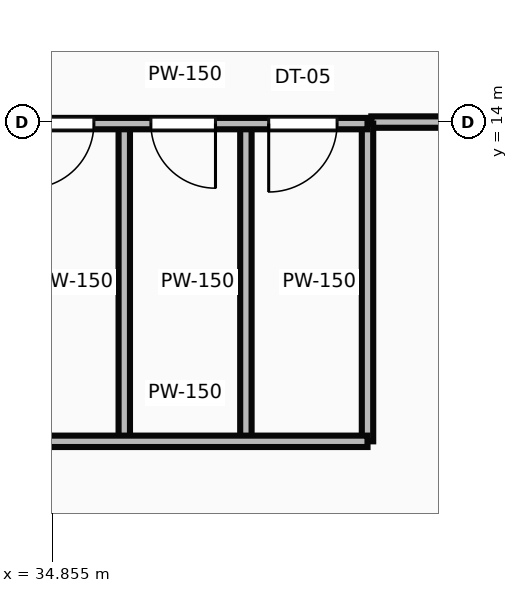
"""IFC4 building model, lengths in metres.
Left out: names, types, materials, properties, quantities, classifications, styles, units other than length and angle.
Written with IfcOpenShell. Run it as: python <this file> out.ifc"""

import sys

from ifc_helpers import new_model, si_unit, direction, frame, frame_2d, origin, place, context, subcontext, project, spatial, rectangle, extrude, source, transform, mapped, element, fill, save


model = new_model("IFC4")
c1 = context("Model", 3, precision=1e-05, world=origin(), true_north=direction((0.0, 1.0)))
c2 = subcontext(c1, "Body", "Model", "MODEL_VIEW")
j1 = project(units=[si_unit("LENGTHUNIT", "METRE"), si_unit("PLANEANGLEUNIT", "RADIAN")], contexts=[c1])
p1 = place(None, origin())
s1 = spatial("IfcSite", under=j1, at=p1, CompositionType="ELEMENT")
p2 = place(p1, origin())
s2 = spatial("IfcBuilding", under=s1, at=p2, CompositionType="ELEMENT")
p3 = place(p2, frame((0.0, 0.0, 32.5)))
s3 = spatial("IfcBuildingStorey", under=s2, at=p3, CompositionType="ELEMENT", Elevation=32.5)
m1 = source(origin(), c2, "Body", "SweptSolid", [
    extrude(rectangle(XDim=4.8, YDim=0.15, at=frame_2d((2.4, 0.0))), origin(), (0.0, 0.0, 1.0), 2.625),
])
p4 = place(p3, frame((34.2, 13.98, 0.0), z_axis=(0.0, 0.0, 1.0), x_axis=(1.0, 0.0, 0.0)))
e1 = element("IfcWall", 1, at=p4, inside=s3, PredefinedType="PARTITIONING", context=c2, shape_type="MappedRepresentation", body=[
    mapped(m1, transform((0.0, 0.0, 0.0))),
])
p5 = place(p4, frame((0.35, 0.0, 0.0)))
e2 = element("IfcOpeningElement", 2, at=p5, cuts=e1, PredefinedType="OPENING", context=c2, shape_type="SweptSolid", body=[
    extrude(rectangle(XDim=0.85, YDim=2.1, at=frame_2d((0.425, 1.05))), frame((0.0, 0.085, 0.0), z_axis=(0.0, -1.0, 0.0), x_axis=(1.0, 0.0, 0.0)), (0.0, 0.0, 1.0), 0.17),
])
p6 = place(p4, frame((1.95, 0.0, 0.0)))
e3 = element("IfcOpeningElement", 3, at=p6, cuts=e1, PredefinedType="OPENING", context=c2, shape_type="SweptSolid", body=[
    extrude(rectangle(XDim=0.85, YDim=2.1, at=frame_2d((0.425, 1.05))), frame((0.0, 0.085, 0.0), z_axis=(0.0, -1.0, 0.0), x_axis=(1.0, 0.0, 0.0)), (0.0, 0.0, 1.0), 0.17),
])
p7 = place(p4, frame((3.5, 0.0, 0.0)))
e4 = element("IfcOpeningElement", 4, at=p7, cuts=e1, PredefinedType="OPENING", context=c2, shape_type="SweptSolid", body=[
    extrude(rectangle(XDim=0.9, YDim=2.1, at=frame_2d((0.45, 1.05))), frame((0.0, 0.085, 0.0), z_axis=(0.0, -1.0, 0.0), x_axis=(1.0, 0.0, 0.0)), (0.0, 0.0, 1.0), 0.17),
])
m2 = source(origin(), c2, "Body", "SweptSolid", [
    extrude(rectangle(XDim=4.8, YDim=0.15, at=frame_2d((2.4, 0.0))), origin(), (0.0, 0.0, 1.0), 3.4),
])
p8 = place(p3, frame((34.2, 9.8, 0.0), z_axis=(0.0, 0.0, 1.0), x_axis=(1.0, 0.0, 0.0)))
e5 = element("IfcWall", 5, at=p8, inside=s3, PredefinedType="PARTITIONING", context=c2, shape_type="MappedRepresentation", body=[
    mapped(m2, transform((0.0, 0.0, 0.0))),
])
m3 = source(origin(), c2, "Body", "SweptSolid", [
    extrude(rectangle(XDim=4.18, YDim=0.15, at=frame_2d((2.09, 0.0))), origin(), (0.0, 0.0, 1.0), 3.4),
])
for number, where, z_axis, x_axis in (
    (6, (39.0, 9.8, 0.0), (0.0, 0.0, 1.0), (0.0, 1.0, 0.0)),
    (7, (35.8, 9.8, 0.0), (0.0, 0.0, 1.0), (0.0, 1.0, 0.0)),
    (8, (37.4, 9.8, 0.0), (0.0, 0.0, 1.0), (0.0, 1.0, 0.0)),
):
    element("IfcWall", number, at=place(p3, frame(where, z_axis=z_axis, x_axis=x_axis)), inside=s3, PredefinedType="PARTITIONING", context=c2, shape_type="MappedRepresentation", body=[
        mapped(m3, transform((0.0, 0.0, 0.0))),
    ])
m4 = source(origin(), c2, "Body", "SweptSolid", [
    extrude(rectangle(XDim=7.75, YDim=0.15, at=frame_2d((3.875, 0.0))), origin(), (0.0, 0.0, 1.0), 2.625),
])
p9 = place(p3, frame((46.8, 14.0, 0.0), z_axis=(0.0, 0.0, 1.0), x_axis=(-1.0, 0.0, 0.0)))
e9 = element("IfcWall", 9, at=p9, inside=s3, PredefinedType="PARTITIONING", context=c2, shape_type="MappedRepresentation", body=[
    mapped(m4, transform((0.0, 0.0, 0.0))),
])
p10 = place(p9, frame((2.226, 0.0, 0.0)))
e10 = element("IfcOpeningElement", 10, at=p10, cuts=e9, PredefinedType="OPENING", context=c2, shape_type="SweptSolid", body=[
    extrude(rectangle(XDim=0.95, YDim=2.15, at=frame_2d((0.475, 1.075))), frame((0.0, 0.085, 0.0), z_axis=(0.0, -1.0, 0.0), x_axis=(1.0, 0.0, 0.0)), (0.0, 0.0, 1.0), 0.17),
])
m5 = source(origin(), c2, "Body", "SweptSolid", [
    extrude(rectangle(XDim=0.85, YDim=2.1, at=frame_2d((0.425, 1.05))), frame((0.0, 0.025, 0.0), z_axis=(0.0, -1.0, 0.0), x_axis=(1.0, 0.0, 0.0)), (0.0, 0.0, 1.0), 0.05),
])
p11 = place(p5, frame((0.85, 0.0, 0.0), z_axis=(0.0, 0.0, 1.0), x_axis=(-1.0, 0.0, 0.0)))
e11 = element("IfcDoor", 11, at=p11, inside=s3, OperationType="SINGLE_SWING_LEFT", PredefinedType="DOOR", context=c2, shape_type="MappedRepresentation", body=[
    mapped(m5, transform((0.0, 0.0, 0.0))),
])
fill(e2, e11)
p12 = place(p6, frame((0.85, 0.0, 0.0), z_axis=(0.0, 0.0, 1.0), x_axis=(-1.0, 0.0, 0.0)))
e12 = element("IfcDoor", 12, at=p12, inside=s3, OperationType="SINGLE_SWING_RIGHT", PredefinedType="DOOR", context=c2, shape_type="MappedRepresentation", body=[
    mapped(m5, transform((0.0, 0.0, 0.0))),
])
fill(e3, e12)
m6 = source(origin(), c2, "Body", "SweptSolid", [
    extrude(rectangle(XDim=0.9, YDim=2.1, at=frame_2d((0.45, 1.05))), frame((0.0, 0.025, 0.0), z_axis=(0.0, -1.0, 0.0), x_axis=(1.0, 0.0, 0.0)), (0.0, 0.0, 1.0), 0.05),
])
p13 = place(p7, frame((0.9, 0.0, 0.0), z_axis=(0.0, 0.0, 1.0), x_axis=(-1.0, 0.0, 0.0)))
e13 = element("IfcDoor", 13, at=p13, inside=s3, OperationType="SINGLE_SWING_LEFT", PredefinedType="DOOR", context=c2, shape_type="MappedRepresentation", body=[
    mapped(m6, transform((0.0, 0.0, 0.0))),
])
fill(e4, e13)
save(model, sys.argv[1])
